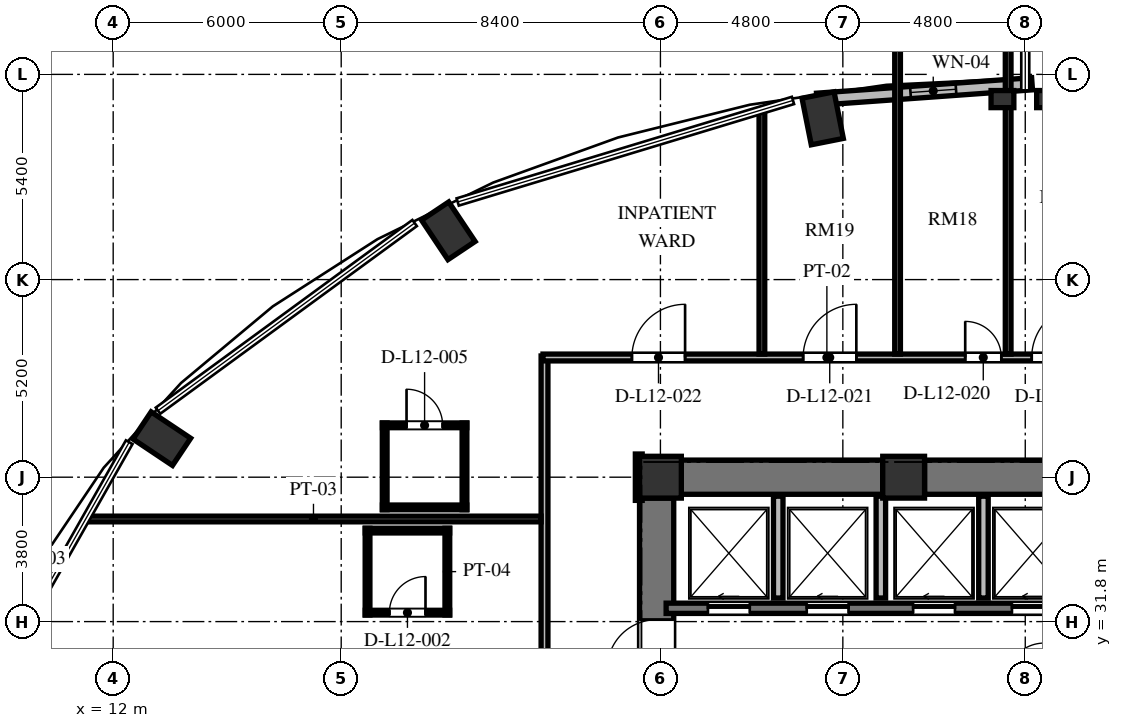
"""IFC4 building model, lengths in metres.
Left out: names, types, materials, properties, quantities, classifications, styles, units other than length and angle.
Written with IfcOpenShell. Run it as: python <this file> out.ifc"""

import sys

from ifc_helpers import new_model, si_unit, direction, frame, frame_2d, origin, origin_2d, place, context, subcontext, project, spatial, rectangle, extrude, element, fill, save


model = new_model("IFC4")
c1 = context("Model", 3, precision=1e-05, world=origin(), true_north=direction((0.0, 1.0)))
c2 = subcontext(c1, "Body", "Model", "MODEL_VIEW")
j1 = project(units=[si_unit("LENGTHUNIT", "METRE"), si_unit("PLANEANGLEUNIT", "RADIAN")], contexts=[c1])
p1 = place(None, origin())
s1 = spatial("IfcSite", under=j1, at=p1, CompositionType="ELEMENT")
p2 = place(p1, origin())
s2 = spatial("IfcBuilding", under=s1, at=p2, CompositionType="ELEMENT")
p3 = place(p2, frame((0.0, 0.0, 50.736)))
s3 = spatial("IfcBuildingStorey", under=s2, at=p3, CompositionType="ELEMENT", Elevation=50.736)
for number, where, z_axis, x_axis in (
    (1, (30.669, 45.044, 0.0), (0.0, 0.0, 1.0), (-0.195, 0.981, 0.0)),
    (2, (20.819, 42.084, 0.0), (0.0, 0.0, 1.0), (-0.556, 0.831, 0.0)),
    (3, (13.28, 36.614, 0.0), (0.0, 0.0, 1.0), (-0.831, 0.556, 0.0)),
):
    element("IfcColumn", number, at=place(p3, frame(where, z_axis=z_axis, x_axis=x_axis)), inside=s3, PredefinedType="COLUMN", context=c2, shape_type="SweptSolid", body=[
        extrude(rectangle(XDim=1.25, YDim=0.86, at=origin_2d()), origin(), (0.0, 0.0, 1.0), 3.648),
    ])
for number, where, z_axis, x_axis in (
    (4, (32.8, 35.6, 0.0), (0.0, 0.0, 1.0), (1.0, 0.0, 0.0)),
    (5, (26.4, 35.6, 0.0), (0.0, 0.0, 1.0), (1.0, 0.0, 0.0)),
):
    element("IfcColumn", number, at=place(p3, frame(where, z_axis=z_axis, x_axis=x_axis)), inside=s3, PredefinedType="COLUMN", context=c2, shape_type="SweptSolid", body=[
        extrude(rectangle(XDim=1.1, YDim=1.1, at=origin_2d()), origin(), (0.0, 0.0, 1.0), 3.648),
    ])
for number, where, z_axis, x_axis in (
    (6, (35.4, 45.55, 0.0), (0.0, 0.0, 1.0), (1.0, 0.0, 0.0)),
    (7, (36.6, 45.55, 0.0), (0.0, 0.0, 1.0), (1.0, 0.0, 0.0)),
):
    element("IfcColumn", number, at=place(p3, frame(where, z_axis=z_axis, x_axis=x_axis)), inside=s3, PredefinedType="PILASTER", context=c2, shape_type="SweptSolid", body=[
        extrude(rectangle(XDim=0.6, YDim=0.45, at=origin_2d()), origin(), (0.0, 0.0, 1.0), 3.648),
    ])
p4 = place(p3, frame((26.3, 20.95, 0.0), z_axis=(0.0, 0.0, 1.0), x_axis=(0.0, 1.0, 0.0)))
e8 = element("IfcWall", 8, at=p4, inside=s3, PredefinedType="SHEAR", context=c2, shape_type="SweptSolid", body=[
    extrude(rectangle(XDim=14.1, YDim=0.9, at=frame_2d((7.05, 0.0))), origin(), (0.0, 0.0, 1.0), 3.648),
])
p5 = place(p4, frame((6.5, 0.0, 0.0)))
e9 = element("IfcOpeningElement", 9, at=p5, cuts=e8, PredefinedType="OPENING", context=c2, shape_type="SweptSolid", body=[
    extrude(rectangle(XDim=1.2, YDim=2.15, at=frame_2d((0.6, 1.075))), frame((0.0, 0.46, 0.0), z_axis=(0.0, -1.0, 0.0), x_axis=(1.0, 0.0, 0.0)), (0.0, 0.0, 1.0), 0.92),
])
p6 = place(p4, frame((9.6, 0.0, 0.0)))
e10 = element("IfcOpeningElement", 10, at=p6, cuts=e8, PredefinedType="OPENING", context=c2, shape_type="SweptSolid", body=[
    extrude(rectangle(XDim=1.3, YDim=2.2, at=frame_2d((0.65, 1.1))), frame((0.0, 0.46, 0.0), z_axis=(0.0, -1.0, 0.0), x_axis=(1.0, 0.0, 0.0)), (0.0, 0.0, 1.0), 0.92),
])
p7 = place(p4, frame((3.26, 0.0, 0.0)))
e11 = element("IfcOpeningElement", 11, at=p7, cuts=e8, PredefinedType="OPENING", context=c2, shape_type="SweptSolid", body=[
    extrude(rectangle(XDim=1.3, YDim=2.2, at=frame_2d((0.65, 1.1))), frame((0.0, 0.46, 0.0), z_axis=(0.0, -1.0, 0.0), x_axis=(1.0, 0.0, 0.0)), (0.0, 0.0, 1.0), 0.92),
])
p8 = place(p3, frame((26.95, 35.6, 0.0), z_axis=(0.0, 0.0, 1.0), x_axis=(1.0, 0.0, 0.0)))
e12 = element("IfcWall", 12, at=p8, inside=s3, PredefinedType="SHEAR", context=c2, shape_type="SweptSolid", body=[
    extrude(rectangle(XDim=5.3, YDim=0.9, at=frame_2d((2.65, 0.0))), origin(), (0.0, 0.0, 1.0), 3.648),
])
p9 = place(p3, frame((33.35, 35.6, 0.0), z_axis=(0.0, 0.0, 1.0), x_axis=(1.0, 0.0, 0.0)))
e13 = element("IfcWall", 13, at=p9, inside=s3, PredefinedType="SHEAR", context=c2, shape_type="SweptSolid", body=[
    extrude(rectangle(XDim=5.3, YDim=0.9, at=frame_2d((2.65, 0.0))), origin(), (0.0, 0.0, 1.0), 3.648),
])
p10 = place(p3, frame((36.179, 45.953, 0.0), z_axis=(0.0, 0.0, 1.0), x_axis=(-0.997421878774, -0.071760683825, 0.0)))
e14 = element("IfcWall", 14, at=p10, inside=s3, PredefinedType="SOLIDWALL", context=c2, shape_type="SweptSolid", body=[
    extrude(rectangle(XDim=5.675, YDim=0.32, at=frame_2d((2.837, 0.0))), origin(), (0.0, 0.0, 1.0), 3.428),
])
p11 = place(p10, frame((2.007, 0.0, 0.85)))
e15 = element("IfcOpeningElement", 15, at=p11, cuts=e14, PredefinedType="OPENING", context=c2, shape_type="SweptSolid", body=[
    extrude(rectangle(XDim=1.2, YDim=1.8, at=frame_2d((0.6, 0.9))), frame((0.0, 0.17, 0.0), z_axis=(0.0, -1.0, 0.0), x_axis=(1.0, 0.0, 0.0)), (0.0, 0.0, 1.0), 0.34),
])
p12 = place(p3, frame((26.55, 32.15, 0.0), z_axis=(0.0, 0.0, 1.0), x_axis=(1.0, 0.0, 0.0)))
e16 = element("IfcWall", 16, at=p12, inside=s3, PredefinedType="SHEAR", context=c2, shape_type="SweptSolid", body=[
    extrude(rectangle(XDim=16.4, YDim=0.27, at=frame_2d((8.2, 0.0))), origin(), (0.0, 0.0, 1.0), 3.648),
])
p13 = place(p12, frame((1.1, 0.0, 0.0)))
e17 = element("IfcOpeningElement", 17, at=p13, cuts=e16, PredefinedType="OPENING", context=c2, shape_type="SweptSolid", body=[
    extrude(rectangle(XDim=1.1, YDim=2.2, at=frame_2d((0.55, 1.1))), frame((0.0, 0.145, 0.0), z_axis=(0.0, -1.0, 0.0), x_axis=(1.0, 0.0, 0.0)), (0.0, 0.0, 1.0), 0.29),
])
p14 = place(p12, frame((3.7, 0.0, 0.0)))
e18 = element("IfcOpeningElement", 18, at=p14, cuts=e16, PredefinedType="OPENING", context=c2, shape_type="SweptSolid", body=[
    extrude(rectangle(XDim=1.1, YDim=2.2, at=frame_2d((0.55, 1.1))), frame((0.0, 0.145, 0.0), z_axis=(0.0, -1.0, 0.0), x_axis=(1.0, 0.0, 0.0)), (0.0, 0.0, 1.0), 0.29),
])
p15 = place(p12, frame((6.5, 0.0, 0.0)))
e19 = element("IfcOpeningElement", 19, at=p15, cuts=e16, PredefinedType="OPENING", context=c2, shape_type="SweptSolid", body=[
    extrude(rectangle(XDim=1.1, YDim=2.2, at=frame_2d((0.55, 1.1))), frame((0.0, 0.145, 0.0), z_axis=(0.0, -1.0, 0.0), x_axis=(1.0, 0.0, 0.0)), (0.0, 0.0, 1.0), 0.29),
])
p16 = place(p12, frame((9.1, 0.0, 0.0)))
e20 = element("IfcOpeningElement", 20, at=p16, cuts=e16, PredefinedType="OPENING", context=c2, shape_type="SweptSolid", body=[
    extrude(rectangle(XDim=1.1, YDim=2.2, at=frame_2d((0.55, 1.1))), frame((0.0, 0.145, 0.0), z_axis=(0.0, -1.0, 0.0), x_axis=(1.0, 0.0, 0.0)), (0.0, 0.0, 1.0), 0.29),
])
p17 = place(p12, frame((11.9, 0.0, 0.0)))
e21 = element("IfcOpeningElement", 21, at=p17, cuts=e16, PredefinedType="OPENING", context=c2, shape_type="SweptSolid", body=[
    extrude(rectangle(XDim=1.1, YDim=2.2, at=frame_2d((0.55, 1.1))), frame((0.0, 0.145, 0.0), z_axis=(0.0, -1.0, 0.0), x_axis=(1.0, 0.0, 0.0)), (0.0, 0.0, 1.0), 0.29),
])
p18 = place(p12, frame((14.5, 0.0, 0.0)))
e22 = element("IfcOpeningElement", 22, at=p18, cuts=e16, PredefinedType="OPENING", context=c2, shape_type="SweptSolid", body=[
    extrude(rectangle(XDim=1.1, YDim=2.2, at=frame_2d((0.55, 1.1))), frame((0.0, 0.145, 0.0), z_axis=(0.0, -1.0, 0.0), x_axis=(1.0, 0.0, 0.0)), (0.0, 0.0, 1.0), 0.29),
])
for number, where, z_axis, x_axis in (
    (23, (29.5, 32.42, 0.0), (0.0, 0.0, 1.0), (0.0, 1.0, 0.0)),
    (24, (32.2, 32.42, 0.0), (0.0, 0.0, 1.0), (0.0, 1.0, 0.0)),
    (25, (34.9, 32.42, 0.0), (0.0, 0.0, 1.0), (0.0, 1.0, 0.0)),
):
    element("IfcWall", number, at=place(p3, frame(where, z_axis=z_axis, x_axis=x_axis)), inside=s3, PredefinedType="SOLIDWALL", context=c2, shape_type="SweptSolid", body=[
        extrude(rectangle(XDim=2.68, YDim=0.25, at=frame_2d((1.34, 0.0))), origin(), (0.0, 0.0, 1.0), 3.428),
    ])
p19 = place(p3, frame((23.35, 29.36, 0.0), z_axis=(0.0, 0.0, 1.0), x_axis=(0.0, 1.0, 0.0)))
e26 = element("IfcWall", 26, at=p19, inside=s3, PredefinedType="PARTITIONING", context=c2, shape_type="SweptSolid", body=[
    extrude(rectangle(XDim=9.43, YDim=0.18, at=frame_2d((4.715, 0.0))), origin(), (0.0, 0.0, 1.0), 3.428),
])
p20 = place(p3, frame((23.31, 38.75, 0.0), z_axis=(0.0, 0.0, 1.0), x_axis=(1.0, 0.0, 0.0)))
e27 = element("IfcWall", 27, at=p20, inside=s3, PredefinedType="PARTITIONING", context=c2, shape_type="SweptSolid", body=[
    extrude(rectangle(XDim=29.88, YDim=0.18, at=frame_2d((14.94, 0.0))), origin(), (0.0, 0.0, 1.0), 3.053),
])
p21 = place(p20, frame((25.891, 0.0, 0.0)))
e28 = element("IfcOpeningElement", 28, at=p21, cuts=e27, PredefinedType="OPENING", context=c2, shape_type="SweptSolid", body=[
    extrude(rectangle(XDim=1.4, YDim=2.2, at=frame_2d((0.7, 1.1))), frame((0.0, 0.1, 0.0), z_axis=(0.0, -1.0, 0.0), x_axis=(1.0, 0.0, 0.0)), (0.0, 0.0, 1.0), 0.2),
])
p22 = place(p20, frame((21.135, 0.0, 0.0)))
e29 = element("IfcOpeningElement", 29, at=p22, cuts=e27, PredefinedType="OPENING", context=c2, shape_type="SweptSolid", body=[
    extrude(rectangle(XDim=1.4, YDim=2.2, at=frame_2d((0.7, 1.1))), frame((0.0, 0.1, 0.0), z_axis=(0.0, -1.0, 0.0), x_axis=(1.0, 0.0, 0.0)), (0.0, 0.0, 1.0), 0.2),
])
p23 = place(p20, frame((17.565, 0.0, 0.0)))
e30 = element("IfcOpeningElement", 30, at=p23, cuts=e27, PredefinedType="OPENING", context=c2, shape_type="SweptSolid", body=[
    extrude(rectangle(XDim=1.4, YDim=2.2, at=frame_2d((0.7, 1.1))), frame((0.0, 0.1, 0.0), z_axis=(0.0, -1.0, 0.0), x_axis=(1.0, 0.0, 0.0)), (0.0, 0.0, 1.0), 0.2),
])
p24 = place(p20, frame((12.86, 0.0, 0.0)))
e31 = element("IfcOpeningElement", 31, at=p24, cuts=e27, PredefinedType="OPENING", context=c2, shape_type="SweptSolid", body=[
    extrude(rectangle(XDim=1.4, YDim=2.2, at=frame_2d((0.7, 1.1))), frame((0.0, 0.1, 0.0), z_axis=(0.0, -1.0, 0.0), x_axis=(1.0, 0.0, 0.0)), (0.0, 0.0, 1.0), 0.2),
])
p25 = place(p20, frame((11.11, 0.0, 0.0)))
e32 = element("IfcOpeningElement", 32, at=p25, cuts=e27, PredefinedType="OPENING", context=c2, shape_type="SweptSolid", body=[
    extrude(rectangle(XDim=0.95, YDim=2.1, at=frame_2d((0.475, 1.05))), frame((0.0, 0.1, 0.0), z_axis=(0.0, -1.0, 0.0), x_axis=(1.0, 0.0, 0.0)), (0.0, 0.0, 1.0), 0.2),
])
p26 = place(p20, frame((6.845, 0.0, 0.0)))
e33 = element("IfcOpeningElement", 33, at=p26, cuts=e27, PredefinedType="OPENING", context=c2, shape_type="SweptSolid", body=[
    extrude(rectangle(XDim=1.4, YDim=2.2, at=frame_2d((0.7, 1.1))), frame((0.0, 0.1, 0.0), z_axis=(0.0, -1.0, 0.0), x_axis=(1.0, 0.0, 0.0)), (0.0, 0.0, 1.0), 0.2),
])
p27 = place(p20, frame((2.339, 0.0, 0.0)))
e34 = element("IfcOpeningElement", 34, at=p27, cuts=e27, PredefinedType="OPENING", context=c2, shape_type="SweptSolid", body=[
    extrude(rectangle(XDim=1.4, YDim=2.2, at=frame_2d((0.7, 1.1))), frame((0.0, 0.1, 0.0), z_axis=(0.0, -1.0, 0.0), x_axis=(1.0, 0.0, 0.0)), (0.0, 0.0, 1.0), 0.2),
])
p28 = place(p3, frame((25.83, 36.21, 0.0), z_axis=(0.0, 0.0, 1.0), x_axis=(0.0, -1.0, 0.0)))
e35 = element("IfcWall", 35, at=p28, inside=s3, PredefinedType="PARTITIONING", context=c2, shape_type="SweptSolid", body=[
    extrude(rectangle(XDim=1.22, YDim=0.18, at=frame_2d((0.61, 0.0))), origin(), (0.0, 0.0, 1.0), 3.428),
])
p29 = place(p3, frame((11.281, 34.5, 0.0), z_axis=(0.0, 0.0, 1.0), x_axis=(1.0, 0.0, 0.0)))
e36 = element("IfcWall", 36, at=p29, inside=s3, PredefinedType="PARTITIONING", context=c2, shape_type="SweptSolid", body=[
    extrude(rectangle(XDim=11.979, YDim=0.15, at=frame_2d((5.99, 0.0))), origin(), (0.0, 0.0, 1.0), 3.428),
])
p30 = place(p3, frame((29.07, 38.84, 0.0), z_axis=(0.0, 0.0, 1.0), x_axis=(0.0, 1.0, 0.0)))
e37 = element("IfcWall", 37, at=p30, inside=s3, PredefinedType="PARTITIONING", context=c2, shape_type="SweptSolid", body=[
    extrude(rectangle(XDim=6.414, YDim=0.15, at=frame_2d((3.207, 0.0))), origin(), (0.0, 0.0, 1.0), 3.428),
])
p31 = place(p3, frame((32.64, 38.84, 0.0), z_axis=(0.0, 0.0, 1.0), x_axis=(0.0, 1.0, 0.0)))
e38 = element("IfcWall", 38, at=p31, inside=s3, PredefinedType="PARTITIONING", context=c2, shape_type="SweptSolid", body=[
    extrude(rectangle(XDim=8.151, YDim=0.15, at=frame_2d((4.075, 0.0))), origin(), (0.0, 0.0, 1.0), 3.428),
])
p32 = place(p3, frame((35.55, 38.84, 0.0), z_axis=(0.0, 0.0, 1.0), x_axis=(0.0, 1.0, 0.0)))
e39 = element("IfcWall", 39, at=p32, inside=s3, PredefinedType="PARTITIONING", context=c2, shape_type="SweptSolid", body=[
    extrude(rectangle(XDim=11.367, YDim=0.15, at=frame_2d((5.684, 0.0))), origin(), (0.0, 0.0, 1.0), 3.428),
])
p33 = place(p3, frame((18.633, 34.195, 0.0), z_axis=(0.0, 0.0, 1.0), x_axis=(1.0, 0.0, 0.0)))
e40 = element("IfcWall", 40, at=p33, inside=s3, PredefinedType="PARTITIONING", context=c2, shape_type="SweptSolid", body=[
    extrude(rectangle(XDim=2.22, YDim=0.125, at=frame_2d((1.11, 0.0))), origin(), (0.0, 0.0, 1.0), 3.428),
])
p34 = place(p3, frame((18.633, 32.035, 0.0), z_axis=(0.0, 0.0, 1.0), x_axis=(1.0, 0.0, 0.0)))
e41 = element("IfcWall", 41, at=p34, inside=s3, PredefinedType="PARTITIONING", context=c2, shape_type="SweptSolid", body=[
    extrude(rectangle(XDim=2.22, YDim=0.125, at=frame_2d((1.11, 0.0))), origin(), (0.0, 0.0, 1.0), 3.428),
])
p35 = place(p34, frame((0.635, 0.0, 0.0)))
e42 = element("IfcOpeningElement", 42, at=p35, cuts=e41, PredefinedType="OPENING", context=c2, shape_type="SweptSolid", body=[
    extrude(rectangle(XDim=0.95, YDim=2.1, at=frame_2d((0.475, 1.05))), frame((0.0, 0.073, 0.0), z_axis=(0.0, -1.0, 0.0), x_axis=(1.0, 0.0, 0.0)), (0.0, 0.0, 1.0), 0.145),
])
for number, where, z_axis, x_axis in (
    (43, (20.793, 31.975, 0.0), (0.0, 0.0, 1.0), (0.0, 1.0, 0.0)),
    (44, (18.693, 31.975, 0.0), (0.0, 0.0, 1.0), (0.0, 1.0, 0.0)),
):
    element("IfcWall", number, at=place(p3, frame(where, z_axis=z_axis, x_axis=x_axis)), inside=s3, PredefinedType="PARTITIONING", context=c2, shape_type="SweptSolid", body=[
        extrude(rectangle(XDim=2.28, YDim=0.125, at=frame_2d((1.14, 0.0))), origin(), (0.0, 0.0, 1.0), 3.428),
    ])
p36 = place(p3, frame((19.084, 36.965, 0.0), z_axis=(0.0, 0.0, 1.0), x_axis=(1.0, 0.0, 0.0)))
e45 = element("IfcWall", 45, at=p36, inside=s3, PredefinedType="PARTITIONING", context=c2, shape_type="SweptSolid", body=[
    extrude(rectangle(XDim=2.22, YDim=0.125, at=frame_2d((1.11, 0.0))), origin(), (0.0, 0.0, 1.0), 3.428),
])
p37 = place(p36, frame((0.635, 0.0, 0.0)))
e46 = element("IfcOpeningElement", 46, at=p37, cuts=e45, PredefinedType="OPENING", context=c2, shape_type="SweptSolid", body=[
    extrude(rectangle(XDim=0.95, YDim=2.1, at=frame_2d((0.475, 1.05))), frame((0.0, 0.073, 0.0), z_axis=(0.0, -1.0, 0.0), x_axis=(1.0, 0.0, 0.0)), (0.0, 0.0, 1.0), 0.145),
])
p38 = place(p3, frame((19.084, 34.805, 0.0), z_axis=(0.0, 0.0, 1.0), x_axis=(1.0, 0.0, 0.0)))
e47 = element("IfcWall", 47, at=p38, inside=s3, PredefinedType="PARTITIONING", context=c2, shape_type="SweptSolid", body=[
    extrude(rectangle(XDim=2.22, YDim=0.125, at=frame_2d((1.11, 0.0))), origin(), (0.0, 0.0, 1.0), 3.428),
])
for number, where, z_axis, x_axis in (
    (48, (21.244, 34.745, 0.0), (0.0, 0.0, 1.0), (0.0, 1.0, 0.0)),
    (49, (19.144, 34.745, 0.0), (0.0, 0.0, 1.0), (0.0, 1.0, 0.0)),
):
    element("IfcWall", number, at=place(p3, frame(where, z_axis=z_axis, x_axis=x_axis)), inside=s3, PredefinedType="PARTITIONING", context=c2, shape_type="SweptSolid", body=[
        extrude(rectangle(XDim=2.28, YDim=0.125, at=frame_2d((1.14, 0.0))), origin(), (0.0, 0.0, 1.0), 3.428),
    ])
p39 = place(p11, origin())
e50 = element("IfcWindow", 50, at=p39, inside=s3, PartitioningType="SINGLE_PANEL", PredefinedType="WINDOW", context=c2, shape_type="SweptSolid", body=[
    extrude(rectangle(XDim=1.2, YDim=1.8, at=frame_2d((0.6, 0.9))), frame((0.0, 0.03, 0.0), z_axis=(0.0, -1.0, 0.0), x_axis=(1.0, 0.0, 0.0)), (0.0, 0.0, 1.0), 0.06),
])
fill(e15, e50)
p40 = place(p6, origin())
e51 = element("IfcDoor", 51, at=p40, inside=s3, OperationType="SINGLE_SWING_LEFT", PredefinedType="DOOR", context=c2, shape_type="SweptSolid", body=[
    extrude(rectangle(XDim=1.3, YDim=2.2, at=frame_2d((0.65, 1.1))), frame((0.0, 0.025, 0.0), z_axis=(0.0, -1.0, 0.0), x_axis=(1.0, 0.0, 0.0)), (0.0, 0.0, 1.0), 0.05),
])
fill(e10, e51)
p41 = place(p13, origin())
e52 = element("IfcDoor", 52, at=p41, inside=s3, OperationType="SLIDING_TO_LEFT", PredefinedType="DOOR", context=c2, shape_type="SweptSolid", body=[
    extrude(rectangle(XDim=1.1, YDim=2.2, at=frame_2d((0.55, 1.1))), frame((0.0, 0.025, 0.0), z_axis=(0.0, -1.0, 0.0), x_axis=(1.0, 0.0, 0.0)), (0.0, 0.0, 1.0), 0.05),
])
fill(e17, e52)
p42 = place(p14, origin())
e53 = element("IfcDoor", 53, at=p42, inside=s3, OperationType="SLIDING_TO_LEFT", PredefinedType="DOOR", context=c2, shape_type="SweptSolid", body=[
    extrude(rectangle(XDim=1.1, YDim=2.2, at=frame_2d((0.55, 1.1))), frame((0.0, 0.025, 0.0), z_axis=(0.0, -1.0, 0.0), x_axis=(1.0, 0.0, 0.0)), (0.0, 0.0, 1.0), 0.05),
])
fill(e18, e53)
p43 = place(p15, origin())
e54 = element("IfcDoor", 54, at=p43, inside=s3, OperationType="SLIDING_TO_LEFT", PredefinedType="DOOR", context=c2, shape_type="SweptSolid", body=[
    extrude(rectangle(XDim=1.1, YDim=2.2, at=frame_2d((0.55, 1.1))), frame((0.0, 0.025, 0.0), z_axis=(0.0, -1.0, 0.0), x_axis=(1.0, 0.0, 0.0)), (0.0, 0.0, 1.0), 0.05),
])
fill(e19, e54)
p44 = place(p16, origin())
e55 = element("IfcDoor", 55, at=p44, inside=s3, OperationType="SLIDING_TO_LEFT", PredefinedType="DOOR", context=c2, shape_type="SweptSolid", body=[
    extrude(rectangle(XDim=1.1, YDim=2.2, at=frame_2d((0.55, 1.1))), frame((0.0, 0.025, 0.0), z_axis=(0.0, -1.0, 0.0), x_axis=(1.0, 0.0, 0.0)), (0.0, 0.0, 1.0), 0.05),
])
fill(e20, e55)
p45 = place(p35, origin())
e56 = element("IfcDoor", 56, at=p45, inside=s3, OperationType="SINGLE_SWING_RIGHT", PredefinedType="DOOR", context=c2, shape_type="SweptSolid", body=[
    extrude(rectangle(XDim=0.95, YDim=2.1, at=frame_2d((0.475, 1.05))), frame((0.0, 0.025, 0.0), z_axis=(0.0, -1.0, 0.0), x_axis=(1.0, 0.0, 0.0)), (0.0, 0.0, 1.0), 0.05),
])
fill(e42, e56)
p46 = place(p24, origin())
e57 = element("IfcDoor", 57, at=p46, inside=s3, OperationType="SINGLE_SWING_RIGHT", PredefinedType="DOOR", context=c2, shape_type="SweptSolid", body=[
    extrude(rectangle(XDim=1.4, YDim=2.2, at=frame_2d((0.7, 1.1))), frame((0.0, 0.025, 0.0), z_axis=(0.0, -1.0, 0.0), x_axis=(1.0, 0.0, 0.0)), (0.0, 0.0, 1.0), 0.05),
])
fill(e31, e57)
p47 = place(p25, origin())
e58 = element("IfcDoor", 58, at=p47, inside=s3, OperationType="SINGLE_SWING_LEFT", PredefinedType="DOOR", context=c2, shape_type="SweptSolid", body=[
    extrude(rectangle(XDim=0.95, YDim=2.1, at=frame_2d((0.475, 1.05))), frame((0.0, 0.025, 0.0), z_axis=(0.0, -1.0, 0.0), x_axis=(1.0, 0.0, 0.0)), (0.0, 0.0, 1.0), 0.05),
])
fill(e32, e58)
p48 = place(p26, origin())
e59 = element("IfcDoor", 59, at=p48, inside=s3, OperationType="SINGLE_SWING_RIGHT", PredefinedType="DOOR", context=c2, shape_type="SweptSolid", body=[
    extrude(rectangle(XDim=1.4, YDim=2.2, at=frame_2d((0.7, 1.1))), frame((0.0, 0.025, 0.0), z_axis=(0.0, -1.0, 0.0), x_axis=(1.0, 0.0, 0.0)), (0.0, 0.0, 1.0), 0.05),
])
fill(e33, e59)
p49 = place(p37, origin())
e60 = element("IfcDoor", 60, at=p49, inside=s3, OperationType="SINGLE_SWING_LEFT", PredefinedType="DOOR", context=c2, shape_type="SweptSolid", body=[
    extrude(rectangle(XDim=0.95, YDim=2.1, at=frame_2d((0.475, 1.05))), frame((0.0, 0.025, 0.0), z_axis=(0.0, -1.0, 0.0), x_axis=(1.0, 0.0, 0.0)), (0.0, 0.0, 1.0), 0.05),
])
fill(e46, e60)
p50 = place(p27, origin())
e61 = element("IfcDoor", 61, at=p50, inside=s3, OperationType="SINGLE_SWING_RIGHT", PredefinedType="DOOR", context=c2, shape_type="SweptSolid", body=[
    extrude(rectangle(XDim=1.4, YDim=2.2, at=frame_2d((0.7, 1.1))), frame((0.0, 0.025, 0.0), z_axis=(0.0, -1.0, 0.0), x_axis=(1.0, 0.0, 0.0)), (0.0, 0.0, 1.0), 0.05),
])
fill(e34, e61)
save(model, sys.argv[1])
